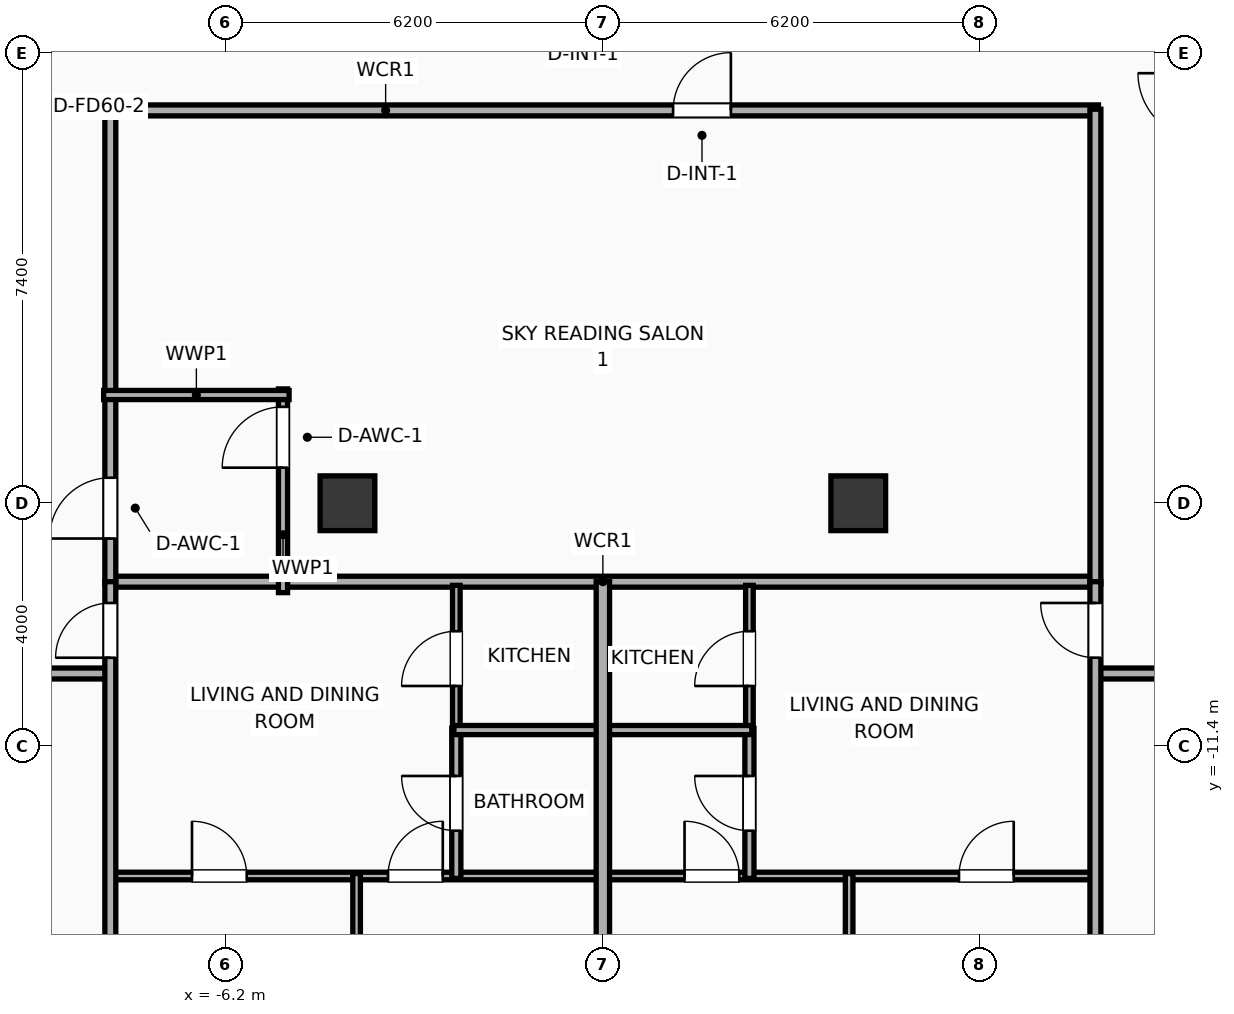
"""IFC4 building model, lengths in metres.
Left out: names, types, materials, properties, quantities, classifications, styles, units other than length and angle.
Written with IfcOpenShell. Run it as: python <this file> out.ifc"""

import sys

from ifc_helpers import new_model, si_unit, direction, frame, frame_2d, origin, origin_2d, place, context, subcontext, project, spatial, rectangle, extrude, element, fill, save


model = new_model("IFC4")
c1 = context("Model", 3, precision=1e-05, world=origin(), true_north=direction((0.0, 1.0)))
c2 = subcontext(c1, "Body", "Model", "MODEL_VIEW")
j1 = project(units=[si_unit("LENGTHUNIT", "METRE"), si_unit("PLANEANGLEUNIT", "RADIAN")], contexts=[c1])
p1 = place(None, origin())
s1 = spatial("IfcSite", under=j1, at=p1, CompositionType="ELEMENT")
p2 = place(p1, origin())
s2 = spatial("IfcBuilding", under=s1, at=p2, CompositionType="ELEMENT")
p3 = place(p2, frame((0.0, 0.0, 187.2)))
s3 = spatial("IfcBuildingStorey", under=s2, at=p3, CompositionType="ELEMENT", Elevation=187.2)
for number, where, z_axis, x_axis in (
    (1, (-4.2, -7.4, 0.0), (0.0, 0.0, 1.0), (1.0, 0.0, 0.0)),
    (2, (4.2, -7.4, 0.0), (0.0, 0.0, 1.0), (1.0, 0.0, 0.0)),
):
    element("IfcColumn", number, at=place(p3, frame(where, z_axis=z_axis, x_axis=x_axis)), inside=s3, PredefinedType="COLUMN", context=c2, shape_type="SweptSolid", body=[
        extrude(rectangle(XDim=0.9, YDim=0.9, at=origin_2d()), origin(), (0.0, 0.0, 1.0), 3.9),
    ])
p4 = place(p3, frame((-8.15, -8.69, 0.0), z_axis=(0.0, 0.0, 1.0), x_axis=(1.0, 0.0, 0.0)))
e3 = element("IfcWall", 3, at=p4, inside=s3, PredefinedType="PARTITIONING", context=c2, shape_type="SweptSolid", body=[
    extrude(rectangle(XDim=16.3, YDim=0.18, at=frame_2d((8.15, 0.0))), origin(), (0.0, 0.0, 1.0), 3.65),
])
p5 = place(p3, frame((-8.15, -0.94, 0.0), z_axis=(0.0, 0.0, 1.0), x_axis=(1.0, 0.0, 0.0)))
e4 = element("IfcWall", 4, at=p5, inside=s3, PredefinedType="PARTITIONING", context=c2, shape_type="SweptSolid", body=[
    extrude(rectangle(XDim=16.3, YDim=0.18, at=frame_2d((8.15, 0.0))), origin(), (0.0, 0.0, 1.0), 3.65),
])
p6 = place(p5, frame((9.305, 0.0, 0.0)))
e5 = element("IfcOpeningElement", 5, at=p6, cuts=e4, PredefinedType="OPENING", context=c2, shape_type="SweptSolid", body=[
    extrude(rectangle(XDim=0.95, YDim=2.05, at=frame_2d((0.475, 1.025))), frame((0.0, 0.1, 0.0), z_axis=(0.0, -1.0, 0.0), x_axis=(1.0, 0.0, 0.0)), (0.0, 0.0, 1.0), 0.2),
])
p7 = place(p3, frame((-8.1, -8.73, 0.0), z_axis=(0.0, 0.0, 1.0), x_axis=(0.0, 1.0, 0.0)))
e6 = element("IfcWall", 6, at=p7, inside=s3, PredefinedType="PARTITIONING", context=c2, shape_type="SweptSolid", body=[
    extrude(rectangle(XDim=7.81, YDim=0.18, at=frame_2d((3.905, 0.0))), origin(), (0.0, 0.0, 1.0), 3.65),
])
p8 = place(p7, frame((0.75, 0.0, 0.0)))
e7 = element("IfcOpeningElement", 7, at=p8, cuts=e6, PredefinedType="OPENING", context=c2, shape_type="SweptSolid", body=[
    extrude(rectangle(XDim=1.0, YDim=2.05, at=frame_2d((0.5, 1.025))), frame((0.0, 0.1, 0.0), z_axis=(0.0, -1.0, 0.0), x_axis=(1.0, 0.0, 0.0)), (0.0, 0.0, 1.0), 0.2),
])
p9 = place(p3, frame((8.1, -8.73, 0.0), z_axis=(0.0, 0.0, 1.0), x_axis=(0.0, 1.0, 0.0)))
e8 = element("IfcWall", 8, at=p9, inside=s3, PredefinedType="PARTITIONING", context=c2, shape_type="SweptSolid", body=[
    extrude(rectangle(XDim=7.81, YDim=0.18, at=frame_2d((3.905, 0.0))), origin(), (0.0, 0.0, 1.0), 3.65),
])
p10 = place(p3, frame((-5.26, -8.87, 0.0), z_axis=(0.0, 0.0, 1.0), x_axis=(0.0, 1.0, 0.0)))
e9 = element("IfcWall", 9, at=p10, inside=s3, PredefinedType="PLUMBINGWALL", context=c2, shape_type="SweptSolid", body=[
    extrude(rectangle(XDim=3.35, YDim=0.15, at=frame_2d((1.675, 0.0))), origin(), (0.0, 0.0, 1.0), 3.65),
])
p11 = place(p10, frame((2.055, 0.0, 0.0)))
e10 = element("IfcOpeningElement", 10, at=p11, cuts=e9, PredefinedType="OPENING", context=c2, shape_type="SweptSolid", body=[
    extrude(rectangle(XDim=1.0, YDim=2.05, at=frame_2d((0.5, 1.025))), frame((0.0, 0.085, 0.0), z_axis=(0.0, -1.0, 0.0), x_axis=(1.0, 0.0, 0.0)), (0.0, 0.0, 1.0), 0.17),
])
p12 = place(p3, frame((-8.21, -5.62, 0.0), z_axis=(0.0, 0.0, 1.0), x_axis=(1.0, 0.0, 0.0)))
e11 = element("IfcWall", 11, at=p12, inside=s3, PredefinedType="PLUMBINGWALL", context=c2, shape_type="SweptSolid", body=[
    extrude(rectangle(XDim=3.05, YDim=0.15, at=frame_2d((1.525, 0.0))), origin(), (0.0, 0.0, 1.0), 3.65),
])
p13 = place(p3, frame((-19.75, -10.2, 0.0), z_axis=(0.0, 0.0, 1.0), x_axis=(1.0, 0.0, 0.0)))
e12 = element("IfcWall", 12, at=p13, inside=s3, PredefinedType="PARTITIONING", context=c2, shape_type="SweptSolid", body=[
    extrude(rectangle(XDim=11.67, YDim=0.18, at=frame_2d((5.835, 0.0))), origin(), (0.0, 0.0, 1.0), 3.65),
])
p14 = place(p13, frame((2.664, 0.0, 0.0)))
e13 = element("IfcOpeningElement", 13, at=p14, cuts=e12, PredefinedType="OPENING", context=c2, shape_type="SweptSolid", body=[
    extrude(rectangle(XDim=0.9, YDim=2.05, at=frame_2d((0.45, 1.025))), frame((0.0, 0.1, 0.0), z_axis=(0.0, -1.0, 0.0), x_axis=(1.0, 0.0, 0.0)), (0.0, 0.0, 1.0), 0.2),
])
p15 = place(p13, frame((9.404, 0.0, 0.0)))
e14 = element("IfcOpeningElement", 14, at=p15, cuts=e12, PredefinedType="OPENING", context=c2, shape_type="SweptSolid", body=[
    extrude(rectangle(XDim=1.15, YDim=2.05, at=frame_2d((0.575, 1.025))), frame((0.0, 0.1, 0.0), z_axis=(0.0, -1.0, 0.0), x_axis=(1.0, 0.0, 0.0)), (0.0, 0.0, 1.0), 0.2),
])
p16 = place(p3, frame((8.08, -10.2, 0.0), z_axis=(0.0, 0.0, 1.0), x_axis=(1.0, 0.0, 0.0)))
e15 = element("IfcWall", 15, at=p16, inside=s3, PredefinedType="PARTITIONING", context=c2, shape_type="SweptSolid", body=[
    extrude(rectangle(XDim=11.67, YDim=0.18, at=frame_2d((5.835, 0.0))), origin(), (0.0, 0.0, 1.0), 3.65),
])
p17 = place(p16, frame((1.213, 0.0, 0.0)))
e16 = element("IfcOpeningElement", 16, at=p17, cuts=e15, PredefinedType="OPENING", context=c2, shape_type="SweptSolid", body=[
    extrude(rectangle(XDim=1.15, YDim=2.05, at=frame_2d((0.575, 1.025))), frame((0.0, 0.1, 0.0), z_axis=(0.0, -1.0, 0.0), x_axis=(1.0, 0.0, 0.0)), (0.0, 0.0, 1.0), 0.2),
])
p18 = place(p16, frame((7.057, 0.0, 0.0)))
e17 = element("IfcOpeningElement", 17, at=p18, cuts=e15, PredefinedType="OPENING", context=c2, shape_type="SweptSolid", body=[
    extrude(rectangle(XDim=1.15, YDim=2.05, at=frame_2d((0.575, 1.025))), frame((0.0, 0.1, 0.0), z_axis=(0.0, -1.0, 0.0), x_axis=(1.0, 0.0, 0.0)), (0.0, 0.0, 1.0), 0.2),
])
p19 = place(p3, frame((-8.08, -13.53, 0.0), z_axis=(0.0, 0.0, 1.0), x_axis=(1.0, 0.0, 0.0)))
e18 = element("IfcWall", 18, at=p19, inside=s3, PredefinedType="PARTITIONING", context=c2, shape_type="SweptSolid", body=[
    extrude(rectangle(XDim=8.06, YDim=0.125, at=frame_2d((4.03, 0.0))), origin(), (0.0, 0.0, 1.0), 3.65),
])
p20 = place(p19, frame((1.323, 0.0, 0.0)))
e19 = element("IfcOpeningElement", 19, at=p20, cuts=e18, PredefinedType="OPENING", context=c2, shape_type="SweptSolid", body=[
    extrude(rectangle(XDim=0.9, YDim=2.05, at=frame_2d((0.45, 1.025))), frame((0.0, 0.073, 0.0), z_axis=(0.0, -1.0, 0.0), x_axis=(1.0, 0.0, 0.0)), (0.0, 0.0, 1.0), 0.145),
])
p21 = place(p19, frame((4.547, 0.0, 0.0)))
e20 = element("IfcOpeningElement", 20, at=p21, cuts=e18, PredefinedType="OPENING", context=c2, shape_type="SweptSolid", body=[
    extrude(rectangle(XDim=0.9, YDim=2.05, at=frame_2d((0.45, 1.025))), frame((0.0, 0.073, 0.0), z_axis=(0.0, -1.0, 0.0), x_axis=(1.0, 0.0, 0.0)), (0.0, 0.0, 1.0), 0.145),
])
p22 = place(p3, frame((-2.41, -11.16, 0.0), z_axis=(0.0, 0.0, 1.0), x_axis=(0.0, 1.0, 0.0)))
e21 = element("IfcWall", 21, at=p22, inside=s3, PredefinedType="PARTITIONING", context=c2, shape_type="SweptSolid", body=[
    extrude(rectangle(XDim=2.41, YDim=0.125, at=frame_2d((1.205, 0.0))), origin(), (0.0, 0.0, 1.0), 3.65),
])
p23 = place(p22, frame((0.755, 0.0, 0.0)))
e22 = element("IfcOpeningElement", 22, at=p23, cuts=e21, PredefinedType="OPENING", context=c2, shape_type="SweptSolid", body=[
    extrude(rectangle(XDim=0.9, YDim=2.05, at=frame_2d((0.45, 1.025))), frame((0.0, 0.073, 0.0), z_axis=(0.0, -1.0, 0.0), x_axis=(1.0, 0.0, 0.0)), (0.0, 0.0, 1.0), 0.145),
])
p24 = place(p3, frame((-2.41, -13.57, 0.0), z_axis=(0.0, 0.0, 1.0), x_axis=(0.0, 1.0, 0.0)))
e23 = element("IfcWall", 23, at=p24, inside=s3, PredefinedType="PLUMBINGWALL", context=c2, shape_type="SweptSolid", body=[
    extrude(rectangle(XDim=2.47, YDim=0.15, at=frame_2d((1.235, 0.0))), origin(), (0.0, 0.0, 1.0), 3.65),
])
p25 = place(p24, frame((0.785, 0.0, 0.0)))
e24 = element("IfcOpeningElement", 24, at=p25, cuts=e23, PredefinedType="OPENING", context=c2, shape_type="SweptSolid", body=[
    extrude(rectangle(XDim=0.9, YDim=2.05, at=frame_2d((0.45, 1.025))), frame((0.0, 0.085, 0.0), z_axis=(0.0, -1.0, 0.0), x_axis=(1.0, 0.0, 0.0)), (0.0, 0.0, 1.0), 0.17),
])
p26 = place(p3, frame((-2.45, -11.13, 0.0), z_axis=(0.0, 0.0, 1.0), x_axis=(1.0, 0.0, 0.0)))
e25 = element("IfcWall", 25, at=p26, inside=s3, PredefinedType="PLUMBINGWALL", context=c2, shape_type="SweptSolid", body=[
    extrude(rectangle(XDim=2.43, YDim=0.15, at=frame_2d((1.215, 0.0))), origin(), (0.0, 0.0, 1.0), 3.65),
])
p27 = place(p3, frame((-4.05, -21.031, 0.0), z_axis=(0.0, 0.0, 1.0), x_axis=(0.0, 1.0, 0.0)))
e26 = element("IfcWall", 26, at=p27, inside=s3, PredefinedType="PARTITIONING", context=c2, shape_type="SweptSolid", body=[
    extrude(rectangle(XDim=7.541, YDim=0.125, at=frame_2d((3.771, 0.0))), origin(), (0.0, 0.0, 1.0), 3.65),
])
p28 = place(p3, frame((-8.1, -21.456, 0.0), z_axis=(0.0, 0.0, 1.0), x_axis=(0.0, 1.0, 0.0)))
e27 = element("IfcWall", 27, at=p28, inside=s3, PredefinedType="PARTITIONING", context=c2, shape_type="SweptSolid", body=[
    extrude(rectangle(XDim=12.766, YDim=0.18, at=frame_2d((6.383, 0.0))), origin(), (0.0, 0.0, 1.0), 3.65),
])
p29 = place(p28, frame((11.516, 0.0, 0.0)))
e28 = element("IfcOpeningElement", 28, at=p29, cuts=e27, PredefinedType="OPENING", context=c2, shape_type="SweptSolid", body=[
    extrude(rectangle(XDim=0.9, YDim=2.05, at=frame_2d((0.45, 1.025))), frame((0.0, 0.1, 0.0), z_axis=(0.0, -1.0, 0.0), x_axis=(1.0, 0.0, 0.0)), (0.0, 0.0, 1.0), 0.2),
])
p30 = place(p3, frame((0.02, -13.53, 0.0), z_axis=(0.0, 0.0, 1.0), x_axis=(1.0, 0.0, 0.0)))
e29 = element("IfcWall", 29, at=p30, inside=s3, PredefinedType="PARTITIONING", context=c2, shape_type="SweptSolid", body=[
    extrude(rectangle(XDim=8.06, YDim=0.125, at=frame_2d((4.03, 0.0))), origin(), (0.0, 0.0, 1.0), 3.65),
])
p31 = place(p30, frame((1.323, 0.0, 0.0)))
e30 = element("IfcOpeningElement", 30, at=p31, cuts=e29, PredefinedType="OPENING", context=c2, shape_type="SweptSolid", body=[
    extrude(rectangle(XDim=0.9, YDim=2.05, at=frame_2d((0.45, 1.025))), frame((0.0, 0.073, 0.0), z_axis=(0.0, -1.0, 0.0), x_axis=(1.0, 0.0, 0.0)), (0.0, 0.0, 1.0), 0.145),
])
p32 = place(p30, frame((5.837, 0.0, 0.0)))
e31 = element("IfcOpeningElement", 31, at=p32, cuts=e29, PredefinedType="OPENING", context=c2, shape_type="SweptSolid", body=[
    extrude(rectangle(XDim=0.9, YDim=2.05, at=frame_2d((0.45, 1.025))), frame((0.0, 0.073, 0.0), z_axis=(0.0, -1.0, 0.0), x_axis=(1.0, 0.0, 0.0)), (0.0, 0.0, 1.0), 0.145),
])
p33 = place(p3, frame((2.41, -11.16, 0.0), z_axis=(0.0, 0.0, 1.0), x_axis=(0.0, 1.0, 0.0)))
e32 = element("IfcWall", 32, at=p33, inside=s3, PredefinedType="PARTITIONING", context=c2, shape_type="SweptSolid", body=[
    extrude(rectangle(XDim=2.41, YDim=0.125, at=frame_2d((1.205, 0.0))), origin(), (0.0, 0.0, 1.0), 3.65),
])
p34 = place(p33, frame((0.755, 0.0, 0.0)))
e33 = element("IfcOpeningElement", 33, at=p34, cuts=e32, PredefinedType="OPENING", context=c2, shape_type="SweptSolid", body=[
    extrude(rectangle(XDim=0.9, YDim=2.05, at=frame_2d((0.45, 1.025))), frame((0.0, 0.073, 0.0), z_axis=(0.0, -1.0, 0.0), x_axis=(1.0, 0.0, 0.0)), (0.0, 0.0, 1.0), 0.145),
])
p35 = place(p3, frame((2.41, -13.57, 0.0), z_axis=(0.0, 0.0, 1.0), x_axis=(0.0, 1.0, 0.0)))
e34 = element("IfcWall", 34, at=p35, inside=s3, PredefinedType="PLUMBINGWALL", context=c2, shape_type="SweptSolid", body=[
    extrude(rectangle(XDim=2.47, YDim=0.15, at=frame_2d((1.235, 0.0))), origin(), (0.0, 0.0, 1.0), 3.65),
])
p36 = place(p35, frame((0.785, 0.0, 0.0)))
e35 = element("IfcOpeningElement", 35, at=p36, cuts=e34, PredefinedType="OPENING", context=c2, shape_type="SweptSolid", body=[
    extrude(rectangle(XDim=0.9, YDim=2.05, at=frame_2d((0.45, 1.025))), frame((0.0, 0.085, 0.0), z_axis=(0.0, -1.0, 0.0), x_axis=(1.0, 0.0, 0.0)), (0.0, 0.0, 1.0), 0.17),
])
p37 = place(p3, frame((0.02, -11.13, 0.0), z_axis=(0.0, 0.0, 1.0), x_axis=(1.0, 0.0, 0.0)))
e36 = element("IfcWall", 36, at=p37, inside=s3, PredefinedType="PLUMBINGWALL", context=c2, shape_type="SweptSolid", body=[
    extrude(rectangle(XDim=2.43, YDim=0.15, at=frame_2d((1.215, 0.0))), origin(), (0.0, 0.0, 1.0), 3.65),
])
p38 = place(p3, frame((4.05, -20.179, 0.0), z_axis=(0.0, 0.0, 1.0), x_axis=(0.0, 1.0, 0.0)))
e37 = element("IfcWall", 37, at=p38, inside=s3, PredefinedType="PARTITIONING", context=c2, shape_type="SweptSolid", body=[
    extrude(rectangle(XDim=6.689, YDim=0.125, at=frame_2d((3.345, 0.0))), origin(), (0.0, 0.0, 1.0), 3.04),
])
p39 = place(p3, frame((8.1, -19.754, 0.0), z_axis=(0.0, 0.0, 1.0), x_axis=(0.0, 1.0, 0.0)))
e38 = element("IfcWall", 38, at=p39, inside=s3, PredefinedType="PARTITIONING", context=c2, shape_type="SweptSolid", body=[
    extrude(rectangle(XDim=11.064, YDim=0.18, at=frame_2d((5.532, 0.0))), origin(), (0.0, 0.0, 1.0), 3.65),
])
p40 = place(p39, frame((9.814, 0.0, 0.0)))
e39 = element("IfcOpeningElement", 39, at=p40, cuts=e38, PredefinedType="OPENING", context=c2, shape_type="SweptSolid", body=[
    extrude(rectangle(XDim=0.9, YDim=2.05, at=frame_2d((0.45, 1.025))), frame((0.0, 0.1, 0.0), z_axis=(0.0, -1.0, 0.0), x_axis=(1.0, 0.0, 0.0)), (0.0, 0.0, 1.0), 0.2),
])
p41 = place(p3, frame((0.0, -20.605, 0.0), z_axis=(0.0, 0.0, 1.0), x_axis=(0.0, 1.0, 0.0)))
e40 = element("IfcWall", 40, at=p41, inside=s3, PredefinedType="PARTITIONING", context=c2, shape_type="SweptSolid", body=[
    extrude(rectangle(XDim=11.915, YDim=0.22, at=frame_2d((5.958, 0.0))), origin(), (0.0, 0.0, 1.0), 3.65),
])
p42 = place(p6, origin())
e41 = element("IfcDoor", 41, at=p42, inside=s3, OperationType="SINGLE_SWING_RIGHT", PredefinedType="DOOR", context=c2, shape_type="SweptSolid", body=[
    extrude(rectangle(XDim=0.95, YDim=2.05, at=frame_2d((0.475, 1.025))), frame((0.0, 0.025, 0.0), z_axis=(0.0, -1.0, 0.0), x_axis=(1.0, 0.0, 0.0)), (0.0, 0.0, 1.0), 0.05),
])
fill(e5, e41)
p43 = place(p8, origin())
e42 = element("IfcDoor", 42, at=p43, inside=s3, OperationType="SINGLE_SWING_LEFT", PredefinedType="DOOR", context=c2, shape_type="SweptSolid", body=[
    extrude(rectangle(XDim=1.0, YDim=2.05, at=frame_2d((0.5, 1.025))), frame((0.0, 0.025, 0.0), z_axis=(0.0, -1.0, 0.0), x_axis=(1.0, 0.0, 0.0)), (0.0, 0.0, 1.0), 0.05),
])
fill(e7, e42)
p44 = place(p11, origin())
e43 = element("IfcDoor", 43, at=p44, inside=s3, OperationType="SINGLE_SWING_LEFT", PredefinedType="DOOR", context=c2, shape_type="SweptSolid", body=[
    extrude(rectangle(XDim=1.0, YDim=2.05, at=frame_2d((0.5, 1.025))), frame((0.0, 0.025, 0.0), z_axis=(0.0, -1.0, 0.0), x_axis=(1.0, 0.0, 0.0)), (0.0, 0.0, 1.0), 0.05),
])
fill(e10, e43)
p45 = place(p20, origin())
e44 = element("IfcDoor", 44, at=p45, inside=s3, OperationType="SINGLE_SWING_LEFT", PredefinedType="DOOR", context=c2, shape_type="SweptSolid", body=[
    extrude(rectangle(XDim=0.9, YDim=2.05, at=frame_2d((0.45, 1.025))), frame((0.0, 0.025, 0.0), z_axis=(0.0, -1.0, 0.0), x_axis=(1.0, 0.0, 0.0)), (0.0, 0.0, 1.0), 0.05),
])
fill(e19, e44)
p46 = place(p21, origin())
e45 = element("IfcDoor", 45, at=p46, inside=s3, OperationType="SINGLE_SWING_RIGHT", PredefinedType="DOOR", context=c2, shape_type="SweptSolid", body=[
    extrude(rectangle(XDim=0.9, YDim=2.05, at=frame_2d((0.45, 1.025))), frame((0.0, 0.025, 0.0), z_axis=(0.0, -1.0, 0.0), x_axis=(1.0, 0.0, 0.0)), (0.0, 0.0, 1.0), 0.05),
])
fill(e20, e45)
p47 = place(p23, origin())
e46 = element("IfcDoor", 46, at=p47, inside=s3, OperationType="SINGLE_SWING_LEFT", PredefinedType="DOOR", context=c2, shape_type="SweptSolid", body=[
    extrude(rectangle(XDim=0.9, YDim=2.05, at=frame_2d((0.45, 1.025))), frame((0.0, 0.025, 0.0), z_axis=(0.0, -1.0, 0.0), x_axis=(1.0, 0.0, 0.0)), (0.0, 0.0, 1.0), 0.05),
])
fill(e22, e46)
p48 = place(p25, origin())
e47 = element("IfcDoor", 47, at=p48, inside=s3, OperationType="SINGLE_SWING_RIGHT", PredefinedType="DOOR", context=c2, shape_type="SweptSolid", body=[
    extrude(rectangle(XDim=0.9, YDim=2.05, at=frame_2d((0.45, 1.025))), frame((0.0, 0.025, 0.0), z_axis=(0.0, -1.0, 0.0), x_axis=(1.0, 0.0, 0.0)), (0.0, 0.0, 1.0), 0.05),
])
fill(e24, e47)
p49 = place(p29, origin())
e48 = element("IfcDoor", 48, at=p49, inside=s3, OperationType="SINGLE_SWING_LEFT", PredefinedType="DOOR", context=c2, shape_type="SweptSolid", body=[
    extrude(rectangle(XDim=0.9, YDim=2.05, at=frame_2d((0.45, 1.025))), frame((0.0, 0.025, 0.0), z_axis=(0.0, -1.0, 0.0), x_axis=(1.0, 0.0, 0.0)), (0.0, 0.0, 1.0), 0.05),
])
fill(e28, e48)
p50 = place(p31, origin())
e49 = element("IfcDoor", 49, at=p50, inside=s3, OperationType="SINGLE_SWING_LEFT", PredefinedType="DOOR", context=c2, shape_type="SweptSolid", body=[
    extrude(rectangle(XDim=0.9, YDim=2.05, at=frame_2d((0.45, 1.025))), frame((0.0, 0.025, 0.0), z_axis=(0.0, -1.0, 0.0), x_axis=(1.0, 0.0, 0.0)), (0.0, 0.0, 1.0), 0.05),
])
fill(e30, e49)
p51 = place(p32, origin())
e50 = element("IfcDoor", 50, at=p51, inside=s3, OperationType="SINGLE_SWING_RIGHT", PredefinedType="DOOR", context=c2, shape_type="SweptSolid", body=[
    extrude(rectangle(XDim=0.9, YDim=2.05, at=frame_2d((0.45, 1.025))), frame((0.0, 0.025, 0.0), z_axis=(0.0, -1.0, 0.0), x_axis=(1.0, 0.0, 0.0)), (0.0, 0.0, 1.0), 0.05),
])
fill(e31, e50)
p52 = place(p34, origin())
e51 = element("IfcDoor", 51, at=p52, inside=s3, OperationType="SINGLE_SWING_LEFT", PredefinedType="DOOR", context=c2, shape_type="SweptSolid", body=[
    extrude(rectangle(XDim=0.9, YDim=2.05, at=frame_2d((0.45, 1.025))), frame((0.0, 0.025, 0.0), z_axis=(0.0, -1.0, 0.0), x_axis=(1.0, 0.0, 0.0)), (0.0, 0.0, 1.0), 0.05),
])
fill(e33, e51)
p53 = place(p36, origin())
e52 = element("IfcDoor", 52, at=p53, inside=s3, OperationType="SINGLE_SWING_RIGHT", PredefinedType="DOOR", context=c2, shape_type="SweptSolid", body=[
    extrude(rectangle(XDim=0.9, YDim=2.05, at=frame_2d((0.45, 1.025))), frame((0.0, 0.025, 0.0), z_axis=(0.0, -1.0, 0.0), x_axis=(1.0, 0.0, 0.0)), (0.0, 0.0, 1.0), 0.05),
])
fill(e35, e52)
p54 = place(p40, origin())
e53 = element("IfcDoor", 53, at=p54, inside=s3, OperationType="SINGLE_SWING_RIGHT", PredefinedType="DOOR", context=c2, shape_type="SweptSolid", body=[
    extrude(rectangle(XDim=0.9, YDim=2.05, at=frame_2d((0.45, 1.025))), frame((0.0, 0.025, 0.0), z_axis=(0.0, -1.0, 0.0), x_axis=(1.0, 0.0, 0.0)), (0.0, 0.0, 1.0), 0.05),
])
fill(e39, e53)
save(model, sys.argv[1])
